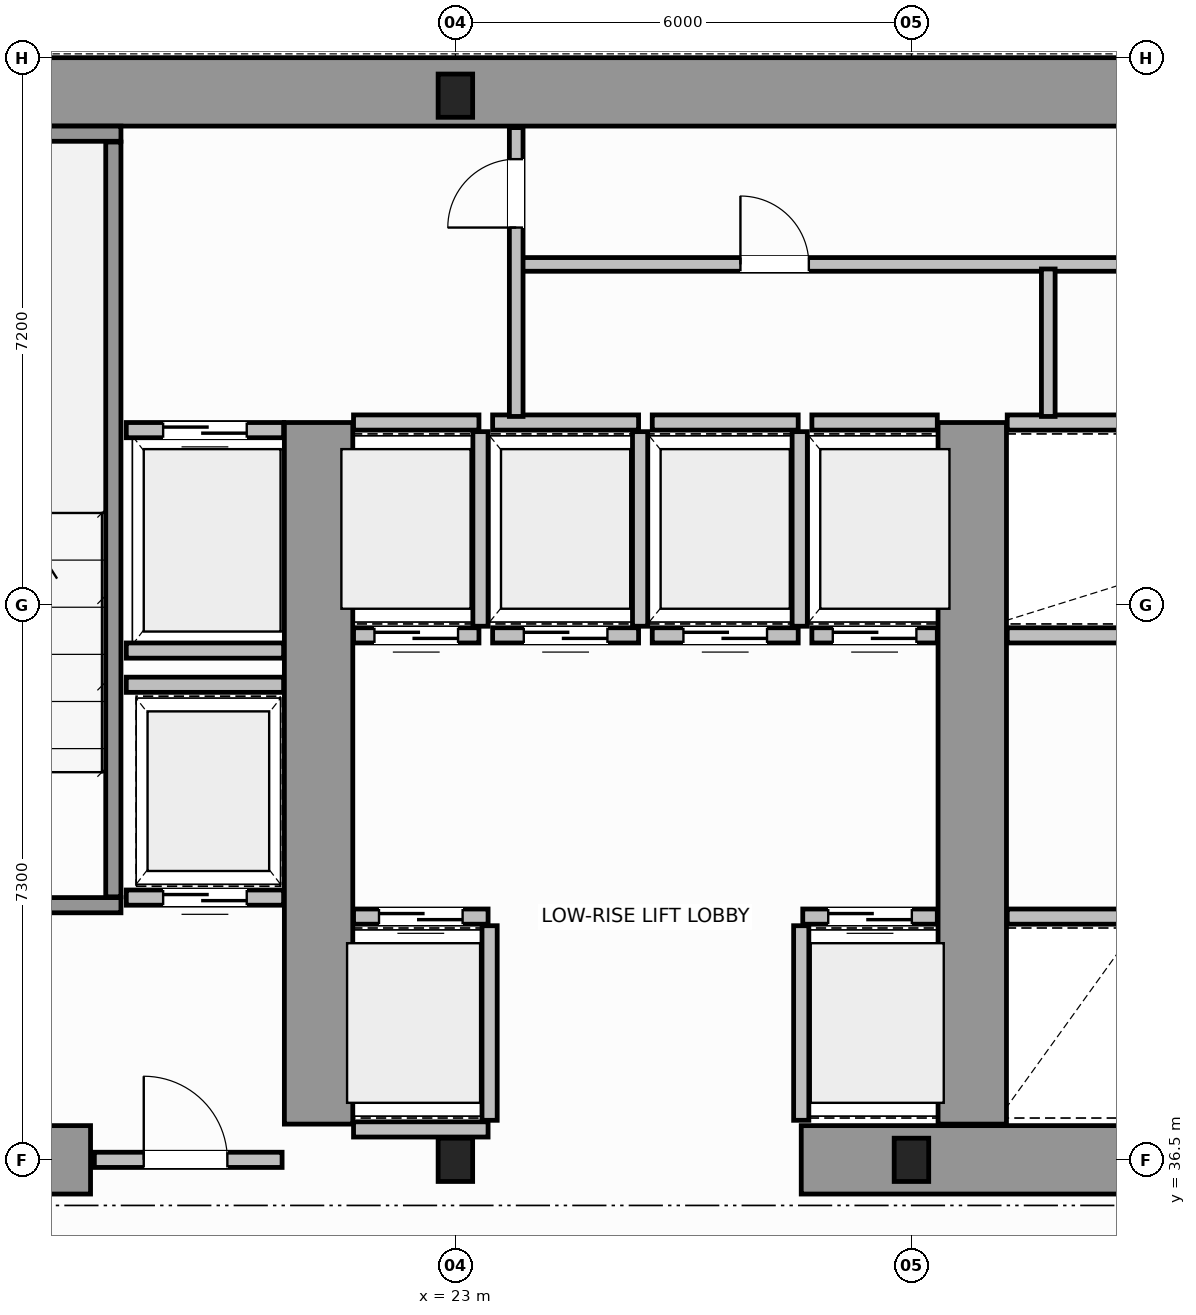
"""IFC4 building model, lengths in metres.
Left out: names, types, materials, properties, quantities, classifications, styles, units other than length and angle.
Written with IfcOpenShell. Run it as: python <this file> out.ifc"""

import sys

from ifc_helpers import new_model, si_unit, direction, frame, frame_2d, origin, origin_2d, place, context, subcontext, project, spatial, rectangle, i_section, extrude, source, transform, mapped, element, fill, save


model = new_model("IFC4")
c1 = context("Model", 3, precision=1e-05, world=origin(), true_north=direction((0.0, 1.0)))
c2 = subcontext(c1, "Body", "Model", "MODEL_VIEW")
j1 = project(units=[si_unit("LENGTHUNIT", "METRE"), si_unit("PLANEANGLEUNIT", "RADIAN")], contexts=[c1])
p1 = place(None, origin())
s1 = spatial("IfcSite", under=j1, at=p1, CompositionType="ELEMENT")
p2 = place(p1, origin())
s2 = spatial("IfcBuilding", under=s1, at=p2, CompositionType="ELEMENT")
p3 = place(p2, frame((0.0, 0.0, 45.4)))
s3 = spatial("IfcBuildingStorey", under=s2, at=p3, CompositionType="ELEMENT", Elevation=45.4)
m1 = source(origin(), c2, "Body", "SweptSolid", [
    extrude(i_section(OverallWidth=0.454, OverallDepth=0.569, WebThickness=0.078, FlangeThickness=0.08, FilletRadius=0.015, at=origin_2d()), origin(), (0.0, 0.0, 1.0), 3.8),
])
for number, where, z_axis, x_axis in (
    (1, (23.0, 36.5, 0.0), (0.0, 0.0, 1.0), (1.0, 0.0, 0.0)),
    (2, (29.0, 36.5, 0.0), (0.0, 0.0, 1.0), (1.0, 0.0, 0.0)),
    (3, (23.0, 50.5, 0.0), (0.0, 0.0, 1.0), (1.0, 0.0, 0.0)),
):
    element("IfcColumn", number, at=place(p3, frame(where, z_axis=z_axis, x_axis=x_axis)), inside=s3, PredefinedType="COLUMN", context=c2, shape_type="MappedRepresentation", body=[
        mapped(m1, transform((0.0, 0.0, 0.0), scale=1.0)),
    ])
p4 = place(p3, frame((14.454, 50.55, 0.0), z_axis=(0.0, 0.0, 1.0), x_axis=(1.0, 0.0, 0.0)))
e4 = element("IfcWall", 4, at=p4, inside=s3, PredefinedType="SHEAR", context=c2, shape_type="SweptSolid", body=[
    extrude(rectangle(XDim=19.544, YDim=0.9, at=frame_2d((9.772, 0.0))), origin(), (0.0, 0.0, 1.0), 3.8),
])
p5 = place(p3, frame((14.47, 36.5, 0.0), z_axis=(0.0, 0.0, 1.0), x_axis=(1.0, 0.0, 0.0)))
e5 = element("IfcWall", 5, at=p5, inside=s3, PredefinedType="SHEAR", context=c2, shape_type="SweptSolid", body=[
    extrude(rectangle(XDim=3.73, YDim=0.9, at=frame_2d((1.865, 0.0))), origin(), (0.0, 0.0, 1.0), 2.38),
])
p6 = place(p3, frame((27.55, 36.5, 0.0), z_axis=(0.0, 0.0, 1.0), x_axis=(1.0, 0.0, 0.0)))
e6 = element("IfcWall", 6, at=p6, inside=s3, PredefinedType="SHEAR", context=c2, shape_type="SweptSolid", body=[
    extrude(rectangle(XDim=4.5, YDim=0.9, at=frame_2d((2.25, 0.0))), origin(), (0.0, 0.0, 1.0), 3.8),
])
for number, where, z_axis, x_axis in (
    (7, (21.2, 36.97, 0.0), (0.0, 0.0, 1.0), (0.0, 1.0, 0.0)),
    (8, (29.8, 36.97, 0.0), (0.0, 0.0, 1.0), (0.0, 1.0, 0.0)),
):
    element("IfcWall", number, at=place(p3, frame(where, z_axis=z_axis, x_axis=x_axis)), inside=s3, PredefinedType="SHEAR", context=c2, shape_type="SweptSolid", body=[
        extrude(rectangle(XDim=9.23, YDim=0.9, at=frame_2d((4.615, 0.0))), origin(), (0.0, 0.0, 1.0), 3.8),
    ])
p7 = place(p3, frame((14.45, 39.85, 0.0), z_axis=(0.0, 0.0, 1.0), x_axis=(1.0, 0.0, 0.0)))
e9 = element("IfcWall", 9, at=p7, inside=s3, PredefinedType="SOLIDWALL", context=c2, shape_type="SweptSolid", body=[
    extrude(rectangle(XDim=4.15, YDim=0.2, at=frame_2d((2.075, 0.0))), origin(), (0.0, 0.0, 1.0), 3.8),
])
p8 = place(p7, frame((1.725, 0.0, 0.0)))
e10 = element("IfcOpeningElement", 10, at=p8, cuts=e9, PredefinedType="OPENING", context=c2, shape_type="SweptSolid", body=[
    extrude(rectangle(XDim=1.1, YDim=2.15, at=frame_2d((0.55, 1.075))), frame((0.0, 0.11, 0.0), z_axis=(0.0, -1.0, 0.0), x_axis=(1.0, 0.0, 0.0)), (0.0, 0.0, 1.0), 0.22),
])
p9 = place(p3, frame((14.45, 50.0, 0.0), z_axis=(0.0, 0.0, 1.0), x_axis=(1.0, 0.0, 0.0)))
e11 = element("IfcWall", 11, at=p9, inside=s3, PredefinedType="SOLIDWALL", context=c2, shape_type="SweptSolid", body=[
    extrude(rectangle(XDim=4.15, YDim=0.2, at=frame_2d((2.075, 0.0))), origin(), (0.0, 0.0, 1.0), 3.8),
])
p10 = place(p3, frame((18.5, 39.96, 0.0), z_axis=(0.0, 0.0, 1.0), x_axis=(0.0, 1.0, 0.0)))
e12 = element("IfcWall", 12, at=p10, inside=s3, PredefinedType="SOLIDWALL", context=c2, shape_type="SweptSolid", body=[
    extrude(rectangle(XDim=9.93, YDim=0.2, at=frame_2d((4.965, 0.0))), origin(), (0.0, 0.0, 1.0), 3.8),
])
p11 = place(p3, frame((18.25, 36.5, 0.0), z_axis=(0.0, 0.0, 1.0), x_axis=(1.0, 0.0, 0.0)))
e13 = element("IfcWall", 13, at=p11, inside=s3, PredefinedType="SOLIDWALL", context=c2, shape_type="SweptSolid", body=[
    extrude(rectangle(XDim=2.47, YDim=0.2, at=frame_2d((1.235, 0.0))), origin(), (0.0, 0.0, 1.0), 2.37),
])
p12 = place(p11, frame((0.65, 0.0, 0.0)))
e14 = element("IfcOpeningElement", 14, at=p12, cuts=e13, PredefinedType="OPENING", context=c2, shape_type="SweptSolid", body=[
    extrude(rectangle(XDim=1.1, YDim=2.15, at=frame_2d((0.55, 1.075))), frame((0.0, 0.11, 0.0), z_axis=(0.0, -1.0, 0.0), x_axis=(1.0, 0.0, 0.0)), (0.0, 0.0, 1.0), 0.22),
])
p13 = place(p3, frame((21.66, 39.7, 0.0), z_axis=(0.0, 0.0, 1.0), x_axis=(1.0, 0.0, 0.0)))
e15 = element("IfcWall", 15, at=p13, inside=s3, PredefinedType="SOLIDWALL", context=c2, shape_type="SweptSolid", body=[
    extrude(rectangle(XDim=1.77, YDim=0.2, at=frame_2d((0.885, 0.0))), origin(), (0.0, 0.0, 1.0), 3.58),
])
p14 = place(p13, frame((0.335, 0.0, 0.0)))
e16 = element("IfcOpeningElement", 16, at=p14, cuts=e15, PredefinedType="OPENING", context=c2, shape_type="SweptSolid", body=[
    extrude(rectangle(XDim=1.1, YDim=2.15, at=frame_2d((0.55, 1.075))), frame((0.0, 0.11, 0.0), z_axis=(0.0, -1.0, 0.0), x_axis=(1.0, 0.0, 0.0)), (0.0, 0.0, 1.0), 0.22),
])
p15 = place(p3, frame((21.66, 36.9, 0.0), z_axis=(0.0, 0.0, 1.0), x_axis=(1.0, 0.0, 0.0)))
e17 = element("IfcWall", 17, at=p15, inside=s3, PredefinedType="SOLIDWALL", context=c2, shape_type="SweptSolid", body=[
    extrude(rectangle(XDim=1.77, YDim=0.2, at=frame_2d((0.885, 0.0))), origin(), (0.0, 0.0, 1.0), 2.37),
])
p16 = place(p3, frame((23.45, 37.02, 0.0), z_axis=(0.0, 0.0, 1.0), x_axis=(0.0, 1.0, 0.0)))
e18 = element("IfcWall", 18, at=p16, inside=s3, PredefinedType="SOLIDWALL", context=c2, shape_type="SweptSolid", body=[
    extrude(rectangle(XDim=2.56, YDim=0.2, at=frame_2d((1.28, 0.0))), origin(), (0.0, 0.0, 1.0), 3.58),
])
p17 = place(p3, frame((27.57, 39.7, 0.0), z_axis=(0.0, 0.0, 1.0), x_axis=(1.0, 0.0, 0.0)))
e19 = element("IfcWall", 19, at=p17, inside=s3, PredefinedType="SOLIDWALL", context=c2, shape_type="SweptSolid", body=[
    extrude(rectangle(XDim=1.77, YDim=0.2, at=frame_2d((0.885, 0.0))), origin(), (0.0, 0.0, 1.0), 3.58),
])
p18 = place(p17, frame((0.335, 0.0, 0.0)))
e20 = element("IfcOpeningElement", 20, at=p18, cuts=e19, PredefinedType="OPENING", context=c2, shape_type="SweptSolid", body=[
    extrude(rectangle(XDim=1.1, YDim=2.15, at=frame_2d((0.55, 1.075))), frame((0.0, 0.11, 0.0), z_axis=(0.0, -1.0, 0.0), x_axis=(1.0, 0.0, 0.0)), (0.0, 0.0, 1.0), 0.22),
])
p19 = place(p3, frame((27.55, 37.02, 0.0), z_axis=(0.0, 0.0, 1.0), x_axis=(0.0, 1.0, 0.0)))
e21 = element("IfcWall", 21, at=p19, inside=s3, PredefinedType="SOLIDWALL", context=c2, shape_type="SweptSolid", body=[
    extrude(rectangle(XDim=2.56, YDim=0.2, at=frame_2d((1.28, 0.0))), origin(), (0.0, 0.0, 1.0), 3.58),
])
p20 = place(p3, frame((21.66, 43.4, 0.0), z_axis=(0.0, 0.0, 1.0), x_axis=(1.0, 0.0, 0.0)))
e22 = element("IfcWall", 22, at=p20, inside=s3, PredefinedType="SOLIDWALL", context=c2, shape_type="SweptSolid", body=[
    extrude(rectangle(XDim=1.65, YDim=0.2, at=frame_2d((0.825, 0.0))), origin(), (0.0, 0.0, 1.0), 3.58),
])
p21 = place(p20, frame((0.275, 0.0, 0.0)))
e23 = element("IfcOpeningElement", 23, at=p21, cuts=e22, PredefinedType="OPENING", context=c2, shape_type="SweptSolid", body=[
    extrude(rectangle(XDim=1.1, YDim=2.15, at=frame_2d((0.55, 1.075))), frame((0.0, 0.11, 0.0), z_axis=(0.0, -1.0, 0.0), x_axis=(1.0, 0.0, 0.0)), (0.0, 0.0, 1.0), 0.22),
])
p22 = place(p3, frame((21.66, 46.2, 0.0), z_axis=(0.0, 0.0, 1.0), x_axis=(1.0, 0.0, 0.0)))
e24 = element("IfcWall", 24, at=p22, inside=s3, PredefinedType="SOLIDWALL", context=c2, shape_type="SweptSolid", body=[
    extrude(rectangle(XDim=1.65, YDim=0.2, at=frame_2d((0.825, 0.0))), origin(), (0.0, 0.0, 1.0), 3.58),
])
p23 = place(p3, frame((23.33, 43.52, 0.0), z_axis=(0.0, 0.0, 1.0), x_axis=(0.0, 1.0, 0.0)))
e25 = element("IfcWall", 25, at=p23, inside=s3, PredefinedType="SOLIDWALL", context=c2, shape_type="SweptSolid", body=[
    extrude(rectangle(XDim=2.56, YDim=0.2, at=frame_2d((1.28, 0.0))), origin(), (0.0, 0.0, 1.0), 3.58),
])
p24 = place(p3, frame((23.49, 43.4, 0.0), z_axis=(0.0, 0.0, 1.0), x_axis=(1.0, 0.0, 0.0)))
e26 = element("IfcWall", 26, at=p24, inside=s3, PredefinedType="SOLIDWALL", context=c2, shape_type="SweptSolid", body=[
    extrude(rectangle(XDim=1.92, YDim=0.2, at=frame_2d((0.96, 0.0))), origin(), (0.0, 0.0, 1.0), 3.58),
])
p25 = place(p24, frame((0.41, 0.0, 0.0)))
e27 = element("IfcOpeningElement", 27, at=p25, cuts=e26, PredefinedType="OPENING", context=c2, shape_type="SweptSolid", body=[
    extrude(rectangle(XDim=1.1, YDim=2.15, at=frame_2d((0.55, 1.075))), frame((0.0, 0.11, 0.0), z_axis=(0.0, -1.0, 0.0), x_axis=(1.0, 0.0, 0.0)), (0.0, 0.0, 1.0), 0.22),
])
p26 = place(p3, frame((23.49, 46.2, 0.0), z_axis=(0.0, 0.0, 1.0), x_axis=(1.0, 0.0, 0.0)))
e28 = element("IfcWall", 28, at=p26, inside=s3, PredefinedType="SOLIDWALL", context=c2, shape_type="SweptSolid", body=[
    extrude(rectangle(XDim=1.92, YDim=0.2, at=frame_2d((0.96, 0.0))), origin(), (0.0, 0.0, 1.0), 3.58),
])
p27 = place(p3, frame((25.43, 43.52, 0.0), z_axis=(0.0, 0.0, 1.0), x_axis=(0.0, 1.0, 0.0)))
e29 = element("IfcWall", 29, at=p27, inside=s3, PredefinedType="SOLIDWALL", context=c2, shape_type="SweptSolid", body=[
    extrude(rectangle(XDim=2.56, YDim=0.2, at=frame_2d((1.28, 0.0))), origin(), (0.0, 0.0, 1.0), 3.58),
])
p28 = place(p3, frame((25.59, 43.4, 0.0), z_axis=(0.0, 0.0, 1.0), x_axis=(1.0, 0.0, 0.0)))
e30 = element("IfcWall", 30, at=p28, inside=s3, PredefinedType="SOLIDWALL", context=c2, shape_type="SweptSolid", body=[
    extrude(rectangle(XDim=1.92, YDim=0.2, at=frame_2d((0.96, 0.0))), origin(), (0.0, 0.0, 1.0), 3.58),
])
p29 = place(p28, frame((0.41, 0.0, 0.0)))
e31 = element("IfcOpeningElement", 31, at=p29, cuts=e30, PredefinedType="OPENING", context=c2, shape_type="SweptSolid", body=[
    extrude(rectangle(XDim=1.1, YDim=2.15, at=frame_2d((0.55, 1.075))), frame((0.0, 0.11, 0.0), z_axis=(0.0, -1.0, 0.0), x_axis=(1.0, 0.0, 0.0)), (0.0, 0.0, 1.0), 0.22),
])
p30 = place(p3, frame((25.59, 46.2, 0.0), z_axis=(0.0, 0.0, 1.0), x_axis=(1.0, 0.0, 0.0)))
e32 = element("IfcWall", 32, at=p30, inside=s3, PredefinedType="SOLIDWALL", context=c2, shape_type="SweptSolid", body=[
    extrude(rectangle(XDim=1.92, YDim=0.2, at=frame_2d((0.96, 0.0))), origin(), (0.0, 0.0, 1.0), 3.58),
])
p31 = place(p3, frame((27.53, 43.52, 0.0), z_axis=(0.0, 0.0, 1.0), x_axis=(0.0, 1.0, 0.0)))
e33 = element("IfcWall", 33, at=p31, inside=s3, PredefinedType="SOLIDWALL", context=c2, shape_type="SweptSolid", body=[
    extrude(rectangle(XDim=2.56, YDim=0.2, at=frame_2d((1.28, 0.0))), origin(), (0.0, 0.0, 1.0), 3.58),
])
p32 = place(p3, frame((27.69, 43.4, 0.0), z_axis=(0.0, 0.0, 1.0), x_axis=(1.0, 0.0, 0.0)))
e34 = element("IfcWall", 34, at=p32, inside=s3, PredefinedType="SOLIDWALL", context=c2, shape_type="SweptSolid", body=[
    extrude(rectangle(XDim=1.65, YDim=0.2, at=frame_2d((0.825, 0.0))), origin(), (0.0, 0.0, 1.0), 3.58),
])
p33 = place(p32, frame((0.275, 0.0, 0.0)))
e35 = element("IfcOpeningElement", 35, at=p33, cuts=e34, PredefinedType="OPENING", context=c2, shape_type="SweptSolid", body=[
    extrude(rectangle(XDim=1.1, YDim=2.15, at=frame_2d((0.55, 1.075))), frame((0.0, 0.11, 0.0), z_axis=(0.0, -1.0, 0.0), x_axis=(1.0, 0.0, 0.0)), (0.0, 0.0, 1.0), 0.22),
])
p34 = place(p3, frame((27.69, 46.2, 0.0), z_axis=(0.0, 0.0, 1.0), x_axis=(1.0, 0.0, 0.0)))
e36 = element("IfcWall", 36, at=p34, inside=s3, PredefinedType="SOLIDWALL", context=c2, shape_type="SweptSolid", body=[
    extrude(rectangle(XDim=1.65, YDim=0.2, at=frame_2d((0.825, 0.0))), origin(), (0.0, 0.0, 1.0), 3.58),
])
p35 = place(p3, frame((30.26, 39.7, 0.0), z_axis=(0.0, 0.0, 1.0), x_axis=(1.0, 0.0, 0.0)))
e37 = element("IfcWall", 37, at=p35, inside=s3, PredefinedType="SOLIDWALL", context=c2, shape_type="SweptSolid", body=[
    extrude(rectangle(XDim=1.77, YDim=0.2, at=frame_2d((0.885, 0.0))), origin(), (0.0, 0.0, 1.0), 3.58),
])
for number, where, z_axis, x_axis in (
    (38, (30.26, 43.4, 0.0), (0.0, 0.0, 1.0), (1.0, 0.0, 0.0)),
    (39, (30.26, 46.2, 0.0), (0.0, 0.0, 1.0), (1.0, 0.0, 0.0)),
):
    element("IfcWall", number, at=place(p3, frame(where, z_axis=z_axis, x_axis=x_axis)), inside=s3, PredefinedType="SOLIDWALL", context=c2, shape_type="SweptSolid", body=[
        extrude(rectangle(XDim=1.65, YDim=0.2, at=frame_2d((0.825, 0.0))), origin(), (0.0, 0.0, 1.0), 3.58),
    ])
p36 = place(p3, frame((18.67, 46.1, 0.0), z_axis=(0.0, 0.0, 1.0), x_axis=(1.0, 0.0, 0.0)))
e40 = element("IfcWall", 40, at=p36, inside=s3, PredefinedType="SOLIDWALL", context=c2, shape_type="SweptSolid", body=[
    extrude(rectangle(XDim=2.07, YDim=0.2, at=frame_2d((1.035, 0.0))), origin(), (0.0, 0.0, 1.0), 3.58),
])
p37 = place(p36, frame((0.485, 0.0, 0.0)))
e41 = element("IfcOpeningElement", 41, at=p37, cuts=e40, PredefinedType="OPENING", context=c2, shape_type="SweptSolid", body=[
    extrude(rectangle(XDim=1.1, YDim=2.15, at=frame_2d((0.55, 1.075))), frame((0.0, 0.11, 0.0), z_axis=(0.0, -1.0, 0.0), x_axis=(1.0, 0.0, 0.0)), (0.0, 0.0, 1.0), 0.22),
])
p38 = place(p3, frame((18.67, 43.2, 0.0), z_axis=(0.0, 0.0, 1.0), x_axis=(1.0, 0.0, 0.0)))
e42 = element("IfcWall", 42, at=p38, inside=s3, PredefinedType="SOLIDWALL", context=c2, shape_type="SweptSolid", body=[
    extrude(rectangle(XDim=2.07, YDim=0.2, at=frame_2d((1.035, 0.0))), origin(), (0.0, 0.0, 1.0), 3.58),
])
p39 = place(p3, frame((18.67, 39.95, 0.0), z_axis=(0.0, 0.0, 1.0), x_axis=(1.0, 0.0, 0.0)))
e43 = element("IfcWall", 43, at=p39, inside=s3, PredefinedType="SOLIDWALL", context=c2, shape_type="SweptSolid", body=[
    extrude(rectangle(XDim=2.07, YDim=0.2, at=frame_2d((1.035, 0.0))), origin(), (0.0, 0.0, 1.0), 3.58),
])
p40 = place(p39, frame((0.485, 0.0, 0.0)))
e44 = element("IfcOpeningElement", 44, at=p40, cuts=e43, PredefinedType="OPENING", context=c2, shape_type="SweptSolid", body=[
    extrude(rectangle(XDim=1.1, YDim=2.15, at=frame_2d((0.55, 1.075))), frame((0.0, 0.11, 0.0), z_axis=(0.0, -1.0, 0.0), x_axis=(1.0, 0.0, 0.0)), (0.0, 0.0, 1.0), 0.22),
])
p41 = place(p3, frame((18.67, 42.75, 0.0), z_axis=(0.0, 0.0, 1.0), x_axis=(1.0, 0.0, 0.0)))
e45 = element("IfcWall", 45, at=p41, inside=s3, PredefinedType="SOLIDWALL", context=c2, shape_type="SweptSolid", body=[
    extrude(rectangle(XDim=2.07, YDim=0.2, at=frame_2d((1.035, 0.0))), origin(), (0.0, 0.0, 1.0), 3.58),
])
p42 = place(p3, frame((23.85, 48.28, 0.0), z_axis=(0.0, 0.0, 1.0), x_axis=(1.0, 0.0, 0.0)))
e46 = element("IfcWall", 46, at=p42, inside=s3, PredefinedType="PLUMBINGWALL", context=c2, shape_type="SweptSolid", body=[
    extrude(rectangle(XDim=15.03, YDim=0.18, at=frame_2d((7.515, 0.0))), origin(), (0.0, 0.0, 1.0), 3.58),
])
p43 = place(p42, frame((2.9, 0.0, 0.0)))
e47 = element("IfcOpeningElement", 47, at=p43, cuts=e46, PredefinedType="OPENING", context=c2, shape_type="SweptSolid", body=[
    extrude(rectangle(XDim=0.9, YDim=2.15, at=frame_2d((0.45, 1.075))), frame((0.0, 0.1, 0.0), z_axis=(0.0, -1.0, 0.0), x_axis=(1.0, 0.0, 0.0)), (0.0, 0.0, 1.0), 0.2),
])
p44 = place(p42, frame((10.4, 0.0, 0.0)))
e48 = element("IfcOpeningElement", 48, at=p44, cuts=e46, PredefinedType="OPENING", context=c2, shape_type="SweptSolid", body=[
    extrude(rectangle(XDim=0.9, YDim=2.15, at=frame_2d((0.45, 1.075))), frame((0.0, 0.1, 0.0), z_axis=(0.0, -1.0, 0.0), x_axis=(1.0, 0.0, 0.0)), (0.0, 0.0, 1.0), 0.2),
])
p45 = place(p3, frame((23.8, 46.28, 0.0), z_axis=(0.0, 0.0, 1.0), x_axis=(0.0, 1.0, 0.0)))
e49 = element("IfcWall", 49, at=p45, inside=s3, PredefinedType="PLUMBINGWALL", context=c2, shape_type="SweptSolid", body=[
    extrude(rectangle(XDim=3.8, YDim=0.18, at=frame_2d((1.9, 0.0))), origin(), (0.0, 0.0, 1.0), 3.58),
])
p46 = place(p45, frame((2.485, 0.0, 0.0)))
e50 = element("IfcOpeningElement", 50, at=p46, cuts=e49, PredefinedType="OPENING", context=c2, shape_type="SweptSolid", body=[
    extrude(rectangle(XDim=0.9, YDim=2.15, at=frame_2d((0.45, 1.075))), frame((0.0, 0.1, 0.0), z_axis=(0.0, -1.0, 0.0), x_axis=(1.0, 0.0, 0.0)), (0.0, 0.0, 1.0), 0.2),
])
p47 = place(p3, frame((30.8, 46.28, 0.0), z_axis=(0.0, 0.0, 1.0), x_axis=(0.0, 1.0, 0.0)))
e51 = element("IfcWall", 51, at=p47, inside=s3, PredefinedType="PLUMBINGWALL", context=c2, shape_type="SweptSolid", body=[
    extrude(rectangle(XDim=1.94, YDim=0.18, at=frame_2d((0.97, 0.0))), origin(), (0.0, 0.0, 1.0), 3.58),
])
m2 = source(origin(), c2, "Body", "SweptSolid", [
    extrude(rectangle(XDim=1.1, YDim=2.15, at=frame_2d((0.55, 1.075))), frame((0.0, 0.025, 0.0), z_axis=(0.0, -1.0, 0.0), x_axis=(1.0, 0.0, 0.0)), (0.0, 0.0, 1.0), 0.05),
])
p48 = place(p12, origin())
e52 = element("IfcDoor", 52, at=p48, inside=s3, OperationType="SINGLE_SWING_RIGHT", PredefinedType="DOOR", context=c2, shape_type="MappedRepresentation", body=[
    mapped(m2, transform((0.0, 0.0, 0.0), scale=1.0)),
])
fill(e14, e52)
p49 = place(p14, origin())
e53 = element("IfcDoor", 53, at=p49, inside=s3, OperationType="DOUBLE_DOOR_SLIDING", PredefinedType="DOOR", context=c2, shape_type="MappedRepresentation", body=[
    mapped(m2, transform((0.0, 0.0, 0.0), scale=1.0)),
])
fill(e16, e53)
p50 = place(p18, origin())
e54 = element("IfcDoor", 54, at=p50, inside=s3, OperationType="DOUBLE_DOOR_SLIDING", PredefinedType="DOOR", context=c2, shape_type="MappedRepresentation", body=[
    mapped(m2, transform((0.0, 0.0, 0.0), scale=1.0)),
])
fill(e20, e54)
p51 = place(p21, origin())
e55 = element("IfcDoor", 55, at=p51, inside=s3, OperationType="DOUBLE_DOOR_SLIDING", PredefinedType="DOOR", context=c2, shape_type="MappedRepresentation", body=[
    mapped(m2, transform((0.0, 0.0, 0.0), scale=1.0)),
])
fill(e23, e55)
p52 = place(p25, origin())
e56 = element("IfcDoor", 56, at=p52, inside=s3, OperationType="DOUBLE_DOOR_SLIDING", PredefinedType="DOOR", context=c2, shape_type="MappedRepresentation", body=[
    mapped(m2, transform((0.0, 0.0, 0.0), scale=1.0)),
])
fill(e27, e56)
p53 = place(p29, origin())
e57 = element("IfcDoor", 57, at=p53, inside=s3, OperationType="DOUBLE_DOOR_SLIDING", PredefinedType="DOOR", context=c2, shape_type="MappedRepresentation", body=[
    mapped(m2, transform((0.0, 0.0, 0.0), scale=1.0)),
])
fill(e31, e57)
p54 = place(p33, origin())
e58 = element("IfcDoor", 58, at=p54, inside=s3, OperationType="DOUBLE_DOOR_SLIDING", PredefinedType="DOOR", context=c2, shape_type="MappedRepresentation", body=[
    mapped(m2, transform((0.0, 0.0, 0.0), scale=1.0)),
])
fill(e35, e58)
p55 = place(p37, origin())
e59 = element("IfcDoor", 59, at=p55, inside=s3, OperationType="DOUBLE_DOOR_SLIDING", PredefinedType="DOOR", context=c2, shape_type="MappedRepresentation", body=[
    mapped(m2, transform((0.0, 0.0, 0.0), scale=1.0)),
])
fill(e41, e59)
p56 = place(p40, origin())
e60 = element("IfcDoor", 60, at=p56, inside=s3, OperationType="DOUBLE_DOOR_SLIDING", PredefinedType="DOOR", context=c2, shape_type="MappedRepresentation", body=[
    mapped(m2, transform((0.0, 0.0, 0.0), scale=1.0)),
])
fill(e44, e60)
m3 = source(origin(), c2, "Body", "SweptSolid", [
    extrude(rectangle(XDim=0.9, YDim=2.15, at=frame_2d((0.45, 1.075))), frame((0.0, 0.025, 0.0), z_axis=(0.0, -1.0, 0.0), x_axis=(1.0, 0.0, 0.0)), (0.0, 0.0, 1.0), 0.05),
])
p57 = place(p46, origin())
e61 = element("IfcDoor", 61, at=p57, inside=s3, OperationType="SINGLE_SWING_LEFT", PredefinedType="DOOR", context=c2, shape_type="MappedRepresentation", body=[
    mapped(m3, transform((0.0, 0.0, 0.0), scale=1.0)),
])
fill(e50, e61)
p58 = place(p43, origin())
e62 = element("IfcDoor", 62, at=p58, inside=s3, OperationType="SINGLE_SWING_RIGHT", PredefinedType="DOOR", context=c2, shape_type="MappedRepresentation", body=[
    mapped(m3, transform((0.0, 0.0, 0.0), scale=1.0)),
])
fill(e47, e62)
save(model, sys.argv[1])
